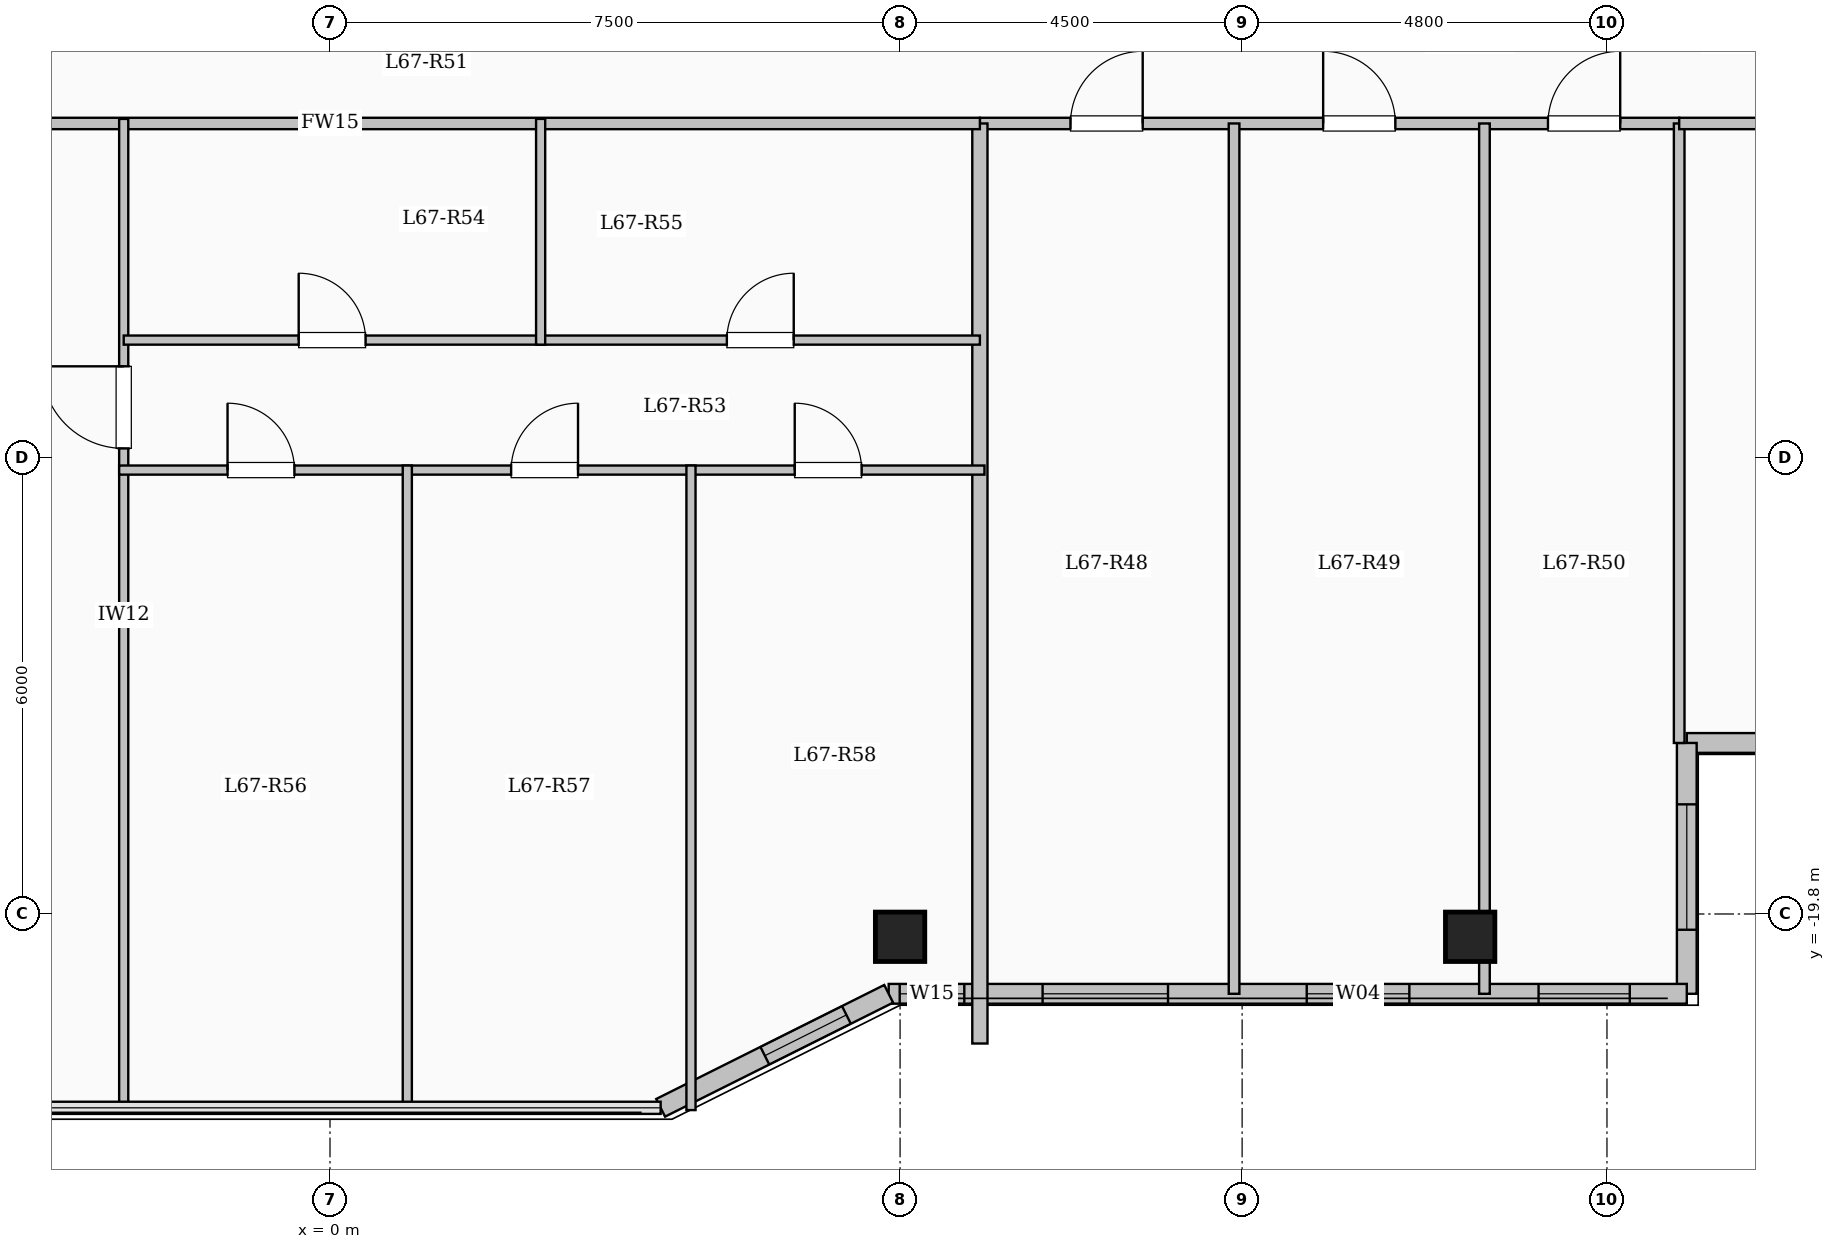
"""IFC4 building model, lengths in metres.
Left out: names, types, materials, properties, quantities, classifications, styles, units other than length and angle.
Written with IfcOpenShell. Run it as: python <this file> out.ifc"""

import sys

from ifc_helpers import new_model, si_unit, direction, frame, frame_2d, origin, origin_2d, place, context, subcontext, project, spatial, rectangle, extrude, element, fill, save


model = new_model("IFC4")
c1 = context("Model", 3, precision=1e-05, world=origin(), true_north=direction((0.0, 1.0)))
c2 = subcontext(c1, "Body", "Model", "MODEL_VIEW")
j1 = project(units=[si_unit("LENGTHUNIT", "METRE"), si_unit("PLANEANGLEUNIT", "RADIAN")], contexts=[c1])
p1 = place(None, origin())
s1 = spatial("IfcSite", under=j1, at=p1, CompositionType="ELEMENT")
p2 = place(p1, origin())
s2 = spatial("IfcBuilding", under=s1, at=p2, CompositionType="ELEMENT")
p3 = place(p2, frame((0.0, 0.0, 248.2)))
s3 = spatial("IfcBuildingStorey", under=s2, at=p3, CompositionType="ELEMENT", Elevation=248.2)
for number, where, z_axis, x_axis in (
    (1, (7.5, -20.1, 0.0), (0.0, 0.0, 1.0), (1.0, 0.0, 0.0)),
    (2, (15.0, -20.1, 0.0), (0.0, 0.0, 1.0), (1.0, 0.0, 0.0)),
):
    element("IfcColumn", number, at=place(p3, frame(where, z_axis=z_axis, x_axis=x_axis)), inside=s3, PredefinedType="COLUMN", context=c2, shape_type="SweptSolid", body=[
        extrude(rectangle(XDim=0.65, YDim=0.65, at=origin_2d()), origin(), (0.0, 0.0, 1.0), 3.35),
    ])
p4 = place(p3, frame((22.65, -17.55, 0.0), z_axis=(0.0, 0.0, 1.0), x_axis=(-1.0, 0.0, 0.0)))
e3 = element("IfcWall", 3, at=p4, inside=s3, PredefinedType="SOLIDWALL", context=c2, shape_type="SweptSolid", body=[
    extrude(rectangle(XDim=4.8, YDim=0.26, at=frame_2d((2.4, 0.0))), origin(), (0.0, 0.0, 1.0), 3.1),
])
p5 = place(p4, frame((1.325, 0.0, 0.9)))
e4 = element("IfcOpeningElement", 4, at=p5, cuts=e3, PredefinedType="OPENING", context=c2, shape_type="SweptSolid", body=[
    extrude(rectangle(XDim=2.2, YDim=1.75, at=frame_2d((1.1, 0.875))), frame((0.0, 0.14, 0.0), z_axis=(0.0, -1.0, 0.0), x_axis=(1.0, 0.0, 0.0)), (0.0, 0.0, 1.0), 0.28),
])
p6 = place(p3, frame((17.85, -17.55, 0.0), z_axis=(0.0, 0.0, 1.0), x_axis=(0.0, -1.0, 0.0)))
e5 = element("IfcWall", 5, at=p6, inside=s3, PredefinedType="SOLIDWALL", context=c2, shape_type="SweptSolid", body=[
    extrude(rectangle(XDim=3.3, YDim=0.26, at=frame_2d((1.65, 0.0))), origin(), (0.0, 0.0, 1.0), 3.1),
])
p7 = place(p6, frame((0.808, 0.0, 0.9)))
e6 = element("IfcOpeningElement", 6, at=p7, cuts=e5, PredefinedType="OPENING", context=c2, shape_type="SweptSolid", body=[
    extrude(rectangle(XDim=1.65, YDim=1.6, at=frame_2d((0.825, 0.8))), frame((0.0, 0.14, 0.0), z_axis=(0.0, -1.0, 0.0), x_axis=(1.0, 0.0, 0.0)), (0.0, 0.0, 1.0), 0.28),
])
p8 = place(p3, frame((17.85, -20.85, 0.0), z_axis=(0.0, 0.0, 1.0), x_axis=(-1.0, 0.0, 0.0)))
e7 = element("IfcWall", 7, at=p8, inside=s3, PredefinedType="SOLIDWALL", context=c2, shape_type="SweptSolid", body=[
    extrude(rectangle(XDim=10.5, YDim=0.26, at=frame_2d((5.25, 0.0))), origin(), (0.0, 0.0, 1.0), 3.1),
])
p9 = place(p8, frame((0.75, 0.0, 0.95)))
e8 = element("IfcOpeningElement", 8, at=p9, cuts=e7, PredefinedType="OPENING", context=c2, shape_type="SweptSolid", body=[
    extrude(rectangle(XDim=1.2, YDim=1.5, at=frame_2d((0.6, 0.75))), frame((0.0, 0.14, 0.0), z_axis=(0.0, -1.0, 0.0), x_axis=(1.0, 0.0, 0.0)), (0.0, 0.0, 1.0), 0.28),
])
p10 = place(p8, frame((3.65, 0.0, 0.95)))
e9 = element("IfcOpeningElement", 9, at=p10, cuts=e7, PredefinedType="OPENING", context=c2, shape_type="SweptSolid", body=[
    extrude(rectangle(XDim=1.35, YDim=1.55, at=frame_2d((0.675, 0.775))), frame((0.0, 0.14, 0.0), z_axis=(0.0, -1.0, 0.0), x_axis=(1.0, 0.0, 0.0)), (0.0, 0.0, 1.0), 0.28),
])
p11 = place(p8, frame((6.825, 0.0, 0.9)))
e10 = element("IfcOpeningElement", 10, at=p11, cuts=e7, PredefinedType="OPENING", context=c2, shape_type="SweptSolid", body=[
    extrude(rectangle(XDim=1.65, YDim=1.6, at=frame_2d((0.825, 0.8))), frame((0.0, 0.14, 0.0), z_axis=(0.0, -1.0, 0.0), x_axis=(1.0, 0.0, 0.0)), (0.0, 0.0, 1.0), 0.28),
])
p12 = place(p8, frame((9.505, 0.0, 0.95)))
e11 = element("IfcOpeningElement", 11, at=p12, cuts=e7, PredefinedType="OPENING", context=c2, shape_type="SweptSolid", body=[
    extrude(rectangle(XDim=0.85, YDim=1.5, at=frame_2d((0.425, 0.75))), frame((0.0, 0.14, 0.0), z_axis=(0.0, -1.0, 0.0), x_axis=(1.0, 0.0, 0.0)), (0.0, 0.0, 1.0), 0.28),
])
p13 = place(p3, frame((7.35, -20.85, 0.0), z_axis=(0.0, 0.0, 1.0), x_axis=(-0.894427191, -0.4472135955, 0.0)))
e12 = element("IfcWall", 12, at=p13, inside=s3, PredefinedType="SOLIDWALL", context=c2, shape_type="SweptSolid", body=[
    extrude(rectangle(XDim=3.354, YDim=0.26, at=frame_2d((1.677, 0.0))), origin(), (0.0, 0.0, 1.0), 3.1),
])
p14 = place(p13, frame((0.622, 0.0, 0.95)))
e13 = element("IfcOpeningElement", 13, at=p14, cuts=e12, PredefinedType="OPENING", context=c2, shape_type="SweptSolid", body=[
    extrude(rectangle(XDim=1.2, YDim=1.5, at=frame_2d((0.6, 0.75))), frame((0.0, 0.14, 0.0), z_axis=(0.0, -1.0, 0.0), x_axis=(1.0, 0.0, 0.0)), (0.0, 0.0, 1.0), 0.28),
])
p15 = place(p3, frame((8.55, -9.4, 0.0), z_axis=(0.0, 0.0, 1.0), x_axis=(1.0, 0.0, 0.0)))
e14 = element("IfcWall", 14, at=p15, inside=s3, PredefinedType="PARTITIONING", context=c2, shape_type="SweptSolid", body=[
    extrude(rectangle(XDim=9.2, YDim=0.15, at=frame_2d((4.6, 0.0))), origin(), (0.0, 0.0, 1.0), 3.1),
])
p16 = place(p15, frame((1.192, 0.0, 0.0)))
e15 = element("IfcOpeningElement", 15, at=p16, cuts=e14, PredefinedType="OPENING", context=c2, shape_type="SweptSolid", body=[
    extrude(rectangle(XDim=0.95, YDim=2.15, at=frame_2d((0.475, 1.075))), frame((0.0, 0.085, 0.0), z_axis=(0.0, -1.0, 0.0), x_axis=(1.0, 0.0, 0.0)), (0.0, 0.0, 1.0), 0.17),
])
p17 = place(p15, frame((4.516, 0.0, 0.0)))
e16 = element("IfcOpeningElement", 16, at=p17, cuts=e14, PredefinedType="OPENING", context=c2, shape_type="SweptSolid", body=[
    extrude(rectangle(XDim=0.95, YDim=2.15, at=frame_2d((0.475, 1.075))), frame((0.0, 0.085, 0.0), z_axis=(0.0, -1.0, 0.0), x_axis=(1.0, 0.0, 0.0)), (0.0, 0.0, 1.0), 0.17),
])
p18 = place(p15, frame((7.474, 0.0, 0.0)))
e17 = element("IfcOpeningElement", 17, at=p18, cuts=e14, PredefinedType="OPENING", context=c2, shape_type="SweptSolid", body=[
    extrude(rectangle(XDim=0.95, YDim=2.15, at=frame_2d((0.475, 1.075))), frame((0.0, 0.085, 0.0), z_axis=(0.0, -1.0, 0.0), x_axis=(1.0, 0.0, 0.0)), (0.0, 0.0, 1.0), 0.17),
])
p19 = place(p3, frame((11.894, -20.85, 0.0), z_axis=(0.0, 0.0, 1.0), x_axis=(0.0, 1.0, 0.0)))
e18 = element("IfcWall", 18, at=p19, inside=s3, PredefinedType="PARTITIONING", context=c2, shape_type="SweptSolid", body=[
    extrude(rectangle(XDim=11.45, YDim=0.14, at=frame_2d((5.725, 0.0))), origin(), (0.0, 0.0, 1.0), 3.1),
])
p20 = place(p3, frame((15.188, -20.85, 0.0), z_axis=(0.0, 0.0, 1.0), x_axis=(0.0, 1.0, 0.0)))
e19 = element("IfcWall", 19, at=p20, inside=s3, PredefinedType="PARTITIONING", context=c2, shape_type="SweptSolid", body=[
    extrude(rectangle(XDim=11.45, YDim=0.14, at=frame_2d((5.725, 0.0))), origin(), (0.0, 0.0, 1.0), 2.685),
])
p21 = place(p3, frame((8.55, -21.504, 0.0), z_axis=(0.0, 0.0, 1.0), x_axis=(0.0, 1.0, 0.0)))
e20 = element("IfcWall", 20, at=p21, inside=s3, PredefinedType="SOLIDWALL", context=c2, shape_type="SweptSolid", body=[
    extrude(rectangle(XDim=12.104, YDim=0.2, at=frame_2d((6.052, 0.0))), origin(), (0.0, 0.0, 1.0), 3.1),
])
p22 = place(p3, frame((-8.55, -9.4, 0.0), z_axis=(0.0, 0.0, 1.0), x_axis=(1.0, 0.0, 0.0)))
e21 = element("IfcWall", 21, at=p22, inside=s3, PredefinedType="PARTITIONING", context=c2, shape_type="SweptSolid", body=[
    extrude(rectangle(XDim=17.1, YDim=0.15, at=frame_2d((8.55, 0.0))), origin(), (0.0, 0.0, 1.0), 3.1),
])
p23 = place(p22, frame((1.75, 0.0, 0.0)))
e22 = element("IfcOpeningElement", 22, at=p23, cuts=e21, PredefinedType="OPENING", context=c2, shape_type="SweptSolid", body=[
    extrude(rectangle(XDim=0.96, YDim=2.15, at=frame_2d((0.48, 1.075))), frame((0.0, 0.085, 0.0), z_axis=(0.0, -1.0, 0.0), x_axis=(1.0, 0.0, 0.0)), (0.0, 0.0, 1.0), 0.17),
])
p24 = place(p3, frame((-2.714, -22.38, 0.0), z_axis=(0.0, 0.0, 1.0), x_axis=(0.0, 1.0, 0.0)))
e23 = element("IfcWall", 23, at=p24, inside=s3, PredefinedType="PARTITIONING", context=c2, shape_type="SweptSolid", body=[
    extrude(rectangle(XDim=13.04, YDim=0.12, at=frame_2d((6.52, 0.0))), origin(), (0.0, 0.0, 1.0), 3.1),
])
p25 = place(p24, frame((8.705, 0.0, 0.0)))
e24 = element("IfcOpeningElement", 24, at=p25, cuts=e23, PredefinedType="OPENING", context=c2, shape_type="SweptSolid", body=[
    extrude(rectangle(XDim=1.08, YDim=2.15, at=frame_2d((0.54, 1.075))), frame((0.0, 0.07, 0.0), z_axis=(0.0, -1.0, 0.0), x_axis=(1.0, 0.0, 0.0)), (0.0, 0.0, 1.0), 0.14),
])
p26 = place(p3, frame((-2.714, -12.25, 0.0), z_axis=(0.0, 0.0, 1.0), x_axis=(1.0, 0.0, 0.0)))
e25 = element("IfcWall", 25, at=p26, inside=s3, PredefinedType="PARTITIONING", context=c2, shape_type="SweptSolid", body=[
    extrude(rectangle(XDim=5.485, YDim=0.12, at=frame_2d((2.743, 0.0))), origin(), (0.0, 0.0, 1.0), 2.785),
])
p27 = place(p26, frame((2.302, 0.0, 0.0)))
e26 = element("IfcOpeningElement", 26, at=p27, cuts=e25, PredefinedType="OPENING", context=c2, shape_type="SweptSolid", body=[
    extrude(rectangle(XDim=0.88, YDim=2.1, at=frame_2d((0.44, 1.05))), frame((0.0, 0.07, 0.0), z_axis=(0.0, -1.0, 0.0), x_axis=(1.0, 0.0, 0.0)), (0.0, 0.0, 1.0), 0.14),
])
p28 = place(p3, frame((2.771, -12.25, 0.0), z_axis=(0.0, 0.0, 1.0), x_axis=(1.0, 0.0, 0.0)))
e27 = element("IfcWall", 27, at=p28, inside=s3, PredefinedType="PARTITIONING", context=c2, shape_type="SweptSolid", body=[
    extrude(rectangle(XDim=5.779, YDim=0.12, at=frame_2d((2.89, 0.0))), origin(), (0.0, 0.0, 1.0), 2.785),
])
p29 = place(p28, frame((2.45, 0.0, 0.0)))
e28 = element("IfcOpeningElement", 28, at=p29, cuts=e27, PredefinedType="OPENING", context=c2, shape_type="SweptSolid", body=[
    extrude(rectangle(XDim=0.88, YDim=2.1, at=frame_2d((0.44, 1.05))), frame((0.0, 0.07, 0.0), z_axis=(0.0, -1.0, 0.0), x_axis=(1.0, 0.0, 0.0)), (0.0, 0.0, 1.0), 0.14),
])
p30 = place(p3, frame((-2.774, -13.96, 0.0), z_axis=(0.0, 0.0, 1.0), x_axis=(1.0, 0.0, 0.0)))
e29 = element("IfcWall", 29, at=p30, inside=s3, PredefinedType="PARTITIONING", context=c2, shape_type="SweptSolid", body=[
    extrude(rectangle(XDim=11.384, YDim=0.12, at=frame_2d((5.692, 0.0))), origin(), (0.0, 0.0, 1.0), 2.785),
])
p31 = place(p30, frame((1.426, 0.0, 0.0)))
e30 = element("IfcOpeningElement", 30, at=p31, cuts=e29, PredefinedType="OPENING", context=c2, shape_type="SweptSolid", body=[
    extrude(rectangle(XDim=0.88, YDim=2.1, at=frame_2d((0.44, 1.05))), frame((0.0, 0.07, 0.0), z_axis=(0.0, -1.0, 0.0), x_axis=(1.0, 0.0, 0.0)), (0.0, 0.0, 1.0), 0.14),
])
p32 = place(p30, frame((5.157, 0.0, 0.0)))
e31 = element("IfcOpeningElement", 31, at=p32, cuts=e29, PredefinedType="OPENING", context=c2, shape_type="SweptSolid", body=[
    extrude(rectangle(XDim=0.88, YDim=2.1, at=frame_2d((0.44, 1.05))), frame((0.0, 0.07, 0.0), z_axis=(0.0, -1.0, 0.0), x_axis=(1.0, 0.0, 0.0)), (0.0, 0.0, 1.0), 0.14),
])
p33 = place(p30, frame((8.888, 0.0, 0.0)))
e32 = element("IfcOpeningElement", 32, at=p33, cuts=e29, PredefinedType="OPENING", context=c2, shape_type="SweptSolid", body=[
    extrude(rectangle(XDim=0.88, YDim=2.1, at=frame_2d((0.44, 1.05))), frame((0.0, 0.07, 0.0), z_axis=(0.0, -1.0, 0.0), x_axis=(1.0, 0.0, 0.0)), (0.0, 0.0, 1.0), 0.14),
])
p34 = place(p3, frame((2.771, -12.31, 0.0), z_axis=(0.0, 0.0, 1.0), x_axis=(0.0, 1.0, 0.0)))
e33 = element("IfcWall", 33, at=p34, inside=s3, PredefinedType="PARTITIONING", context=c2, shape_type="SweptSolid", body=[
    extrude(rectangle(XDim=2.97, YDim=0.12, at=frame_2d((1.485, 0.0))), origin(), (0.0, 0.0, 1.0), 3.1),
])
for number, where, z_axis, x_axis in (
    (34, (1.017, -22.38, 0.0), (0.0, 0.0, 1.0), (0.0, 1.0, 0.0)),
    (35, (4.749, -22.38, 0.0), (0.0, 0.0, 1.0), (0.0, 1.0, 0.0)),
):
    element("IfcWall", number, at=place(p3, frame(where, z_axis=z_axis, x_axis=x_axis)), inside=s3, PredefinedType="PARTITIONING", context=c2, shape_type="SweptSolid", body=[
        extrude(rectangle(XDim=8.48, YDim=0.12, at=frame_2d((4.24, 0.0))), origin(), (0.0, 0.0, 1.0), 3.1),
    ])
p35 = place(p3, frame((17.75, -17.55, 0.0), z_axis=(0.0, 0.0, 1.0), x_axis=(0.0, 1.0, 0.0)))
e36 = element("IfcWall", 36, at=p35, inside=s3, PredefinedType="PARTITIONING", context=c2, shape_type="SweptSolid", body=[
    extrude(rectangle(XDim=8.15, YDim=0.14, at=frame_2d((4.075, 0.0))), origin(), (0.0, 0.0, 1.0), 3.1),
])
p36 = place(p3, frame((17.75, -9.4, 0.0), z_axis=(0.0, 0.0, 1.0), x_axis=(1.0, 0.0, 0.0)))
e37 = element("IfcWall", 37, at=p36, inside=s3, PredefinedType="PARTITIONING", context=c2, shape_type="SweptSolid", body=[
    extrude(rectangle(XDim=4.93, YDim=0.15, at=frame_2d((2.465, 0.0))), origin(), (0.0, 0.0, 1.0), 3.1),
])
p37 = place(p36, frame((1.99, 0.0, 0.0)))
e38 = element("IfcOpeningElement", 38, at=p37, cuts=e37, PredefinedType="OPENING", context=c2, shape_type="SweptSolid", body=[
    extrude(rectangle(XDim=0.95, YDim=2.15, at=frame_2d((0.475, 1.075))), frame((0.0, 0.085, 0.0), z_axis=(0.0, -1.0, 0.0), x_axis=(1.0, 0.0, 0.0)), (0.0, 0.0, 1.0), 0.17),
])
p38 = place(p7, origin())
e39 = element("IfcWindow", 39, at=p38, inside=s3, PartitioningType="SINGLE_PANEL", PredefinedType="WINDOW", context=c2, shape_type="SweptSolid", body=[
    extrude(rectangle(XDim=1.65, YDim=1.6, at=frame_2d((0.825, 0.8))), frame((0.0, 0.03, 0.0), z_axis=(0.0, -1.0, 0.0), x_axis=(1.0, 0.0, 0.0)), (0.0, 0.0, 1.0), 0.06),
])
fill(e6, e39)
p39 = place(p9, origin())
e40 = element("IfcWindow", 40, at=p39, inside=s3, PartitioningType="SINGLE_PANEL", PredefinedType="WINDOW", context=c2, shape_type="SweptSolid", body=[
    extrude(rectangle(XDim=1.2, YDim=1.5, at=frame_2d((0.6, 0.75))), frame((0.0, 0.03, 0.0), z_axis=(0.0, -1.0, 0.0), x_axis=(1.0, 0.0, 0.0)), (0.0, 0.0, 1.0), 0.06),
])
fill(e8, e40)
p40 = place(p10, origin())
e41 = element("IfcWindow", 41, at=p40, inside=s3, PartitioningType="SINGLE_PANEL", PredefinedType="WINDOW", context=c2, shape_type="SweptSolid", body=[
    extrude(rectangle(XDim=1.35, YDim=1.55, at=frame_2d((0.675, 0.775))), frame((0.0, 0.03, 0.0), z_axis=(0.0, -1.0, 0.0), x_axis=(1.0, 0.0, 0.0)), (0.0, 0.0, 1.0), 0.06),
])
fill(e9, e41)
p41 = place(p11, origin())
e42 = element("IfcWindow", 42, at=p41, inside=s3, PartitioningType="SINGLE_PANEL", PredefinedType="WINDOW", context=c2, shape_type="SweptSolid", body=[
    extrude(rectangle(XDim=1.65, YDim=1.6, at=frame_2d((0.825, 0.8))), frame((0.0, 0.03, 0.0), z_axis=(0.0, -1.0, 0.0), x_axis=(1.0, 0.0, 0.0)), (0.0, 0.0, 1.0), 0.06),
])
fill(e10, e42)
p42 = place(p12, origin())
e43 = element("IfcWindow", 43, at=p42, inside=s3, PartitioningType="SINGLE_PANEL", PredefinedType="WINDOW", context=c2, shape_type="SweptSolid", body=[
    extrude(rectangle(XDim=0.85, YDim=1.5, at=frame_2d((0.425, 0.75))), frame((0.0, 0.03, 0.0), z_axis=(0.0, -1.0, 0.0), x_axis=(1.0, 0.0, 0.0)), (0.0, 0.0, 1.0), 0.06),
])
fill(e11, e43)
p43 = place(p14, origin())
e44 = element("IfcWindow", 44, at=p43, inside=s3, PartitioningType="SINGLE_PANEL", PredefinedType="WINDOW", context=c2, shape_type="SweptSolid", body=[
    extrude(rectangle(XDim=1.2, YDim=1.5, at=frame_2d((0.6, 0.75))), frame((0.0, 0.03, 0.0), z_axis=(0.0, -1.0, 0.0), x_axis=(1.0, 0.0, 0.0)), (0.0, 0.0, 1.0), 0.06),
])
fill(e13, e44)
p44 = place(p16, origin())
e45 = element("IfcDoor", 45, at=p44, inside=s3, OperationType="SINGLE_SWING_RIGHT", PredefinedType="DOOR", context=c2, shape_type="SweptSolid", body=[
    extrude(rectangle(XDim=0.95, YDim=2.15, at=frame_2d((0.475, 1.075))), frame((0.0, 0.025, 0.0), z_axis=(0.0, -1.0, 0.0), x_axis=(1.0, 0.0, 0.0)), (0.0, 0.0, 1.0), 0.05),
])
fill(e15, e45)
p45 = place(p17, origin())
e46 = element("IfcDoor", 46, at=p45, inside=s3, OperationType="SINGLE_SWING_LEFT", PredefinedType="DOOR", context=c2, shape_type="SweptSolid", body=[
    extrude(rectangle(XDim=0.95, YDim=2.15, at=frame_2d((0.475, 1.075))), frame((0.0, 0.025, 0.0), z_axis=(0.0, -1.0, 0.0), x_axis=(1.0, 0.0, 0.0)), (0.0, 0.0, 1.0), 0.05),
])
fill(e16, e46)
p46 = place(p18, origin())
e47 = element("IfcDoor", 47, at=p46, inside=s3, OperationType="SINGLE_SWING_RIGHT", PredefinedType="DOOR", context=c2, shape_type="SweptSolid", body=[
    extrude(rectangle(XDim=0.95, YDim=2.15, at=frame_2d((0.475, 1.075))), frame((0.0, 0.025, 0.0), z_axis=(0.0, -1.0, 0.0), x_axis=(1.0, 0.0, 0.0)), (0.0, 0.0, 1.0), 0.05),
])
fill(e17, e47)
p47 = place(p25, origin())
e48 = element("IfcDoor", 48, at=p47, inside=s3, OperationType="SINGLE_SWING_RIGHT", PredefinedType="DOOR", context=c2, shape_type="SweptSolid", body=[
    extrude(rectangle(XDim=1.08, YDim=2.15, at=frame_2d((0.54, 1.075))), frame((0.0, 0.025, 0.0), z_axis=(0.0, -1.0, 0.0), x_axis=(1.0, 0.0, 0.0)), (0.0, 0.0, 1.0), 0.05),
])
fill(e24, e48)
p48 = place(p27, origin())
e49 = element("IfcDoor", 49, at=p48, inside=s3, OperationType="SINGLE_SWING_LEFT", PredefinedType="DOOR", context=c2, shape_type="SweptSolid", body=[
    extrude(rectangle(XDim=0.88, YDim=2.1, at=frame_2d((0.44, 1.05))), frame((0.0, 0.025, 0.0), z_axis=(0.0, -1.0, 0.0), x_axis=(1.0, 0.0, 0.0)), (0.0, 0.0, 1.0), 0.05),
])
fill(e26, e49)
p49 = place(p29, origin())
e50 = element("IfcDoor", 50, at=p49, inside=s3, OperationType="SINGLE_SWING_RIGHT", PredefinedType="DOOR", context=c2, shape_type="SweptSolid", body=[
    extrude(rectangle(XDim=0.88, YDim=2.1, at=frame_2d((0.44, 1.05))), frame((0.0, 0.025, 0.0), z_axis=(0.0, -1.0, 0.0), x_axis=(1.0, 0.0, 0.0)), (0.0, 0.0, 1.0), 0.05),
])
fill(e28, e50)
p50 = place(p31, origin())
e51 = element("IfcDoor", 51, at=p50, inside=s3, OperationType="SINGLE_SWING_LEFT", PredefinedType="DOOR", context=c2, shape_type="SweptSolid", body=[
    extrude(rectangle(XDim=0.88, YDim=2.1, at=frame_2d((0.44, 1.05))), frame((0.0, 0.025, 0.0), z_axis=(0.0, -1.0, 0.0), x_axis=(1.0, 0.0, 0.0)), (0.0, 0.0, 1.0), 0.05),
])
fill(e30, e51)
p51 = place(p32, origin())
e52 = element("IfcDoor", 52, at=p51, inside=s3, OperationType="SINGLE_SWING_RIGHT", PredefinedType="DOOR", context=c2, shape_type="SweptSolid", body=[
    extrude(rectangle(XDim=0.88, YDim=2.1, at=frame_2d((0.44, 1.05))), frame((0.0, 0.025, 0.0), z_axis=(0.0, -1.0, 0.0), x_axis=(1.0, 0.0, 0.0)), (0.0, 0.0, 1.0), 0.05),
])
fill(e31, e52)
p52 = place(p33, origin())
e53 = element("IfcDoor", 53, at=p52, inside=s3, OperationType="SINGLE_SWING_LEFT", PredefinedType="DOOR", context=c2, shape_type="SweptSolid", body=[
    extrude(rectangle(XDim=0.88, YDim=2.1, at=frame_2d((0.44, 1.05))), frame((0.0, 0.025, 0.0), z_axis=(0.0, -1.0, 0.0), x_axis=(1.0, 0.0, 0.0)), (0.0, 0.0, 1.0), 0.05),
])
fill(e32, e53)
save(model, sys.argv[1])
